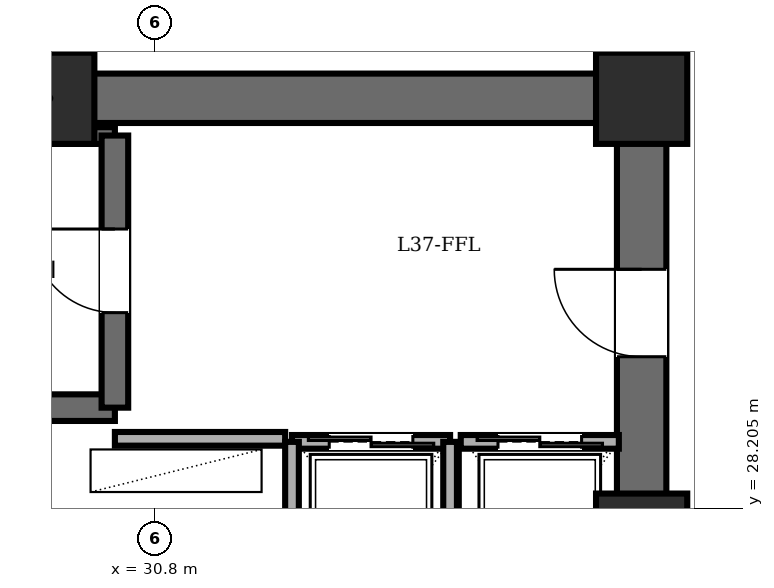
"""IFC4 building model, lengths in metres.
Left out: names, types, materials, properties, quantities, classifications, styles, units other than length and angle.
Written with IfcOpenShell. Run it as: python <this file> out.ifc"""

import sys

from ifc_helpers import new_model, si_unit, direction, frame, frame_2d, origin, origin_2d, place, context, subcontext, project, spatial, rectangle, extrude, element, fill, save


model = new_model("IFC4")
c1 = context("Model", 3, precision=1e-05, world=origin(), true_north=direction((0.0, 1.0)))
c2 = subcontext(c1, "Body", "Model", "MODEL_VIEW")
j1 = project(units=[si_unit("LENGTHUNIT", "METRE"), si_unit("PLANEANGLEUNIT", "RADIAN")], contexts=[c1])
p1 = place(None, origin())
s1 = spatial("IfcSite", under=j1, at=p1, CompositionType="ELEMENT")
p2 = place(p1, origin())
s2 = spatial("IfcBuilding", under=s1, at=p2, CompositionType="ELEMENT")
p3 = place(p2, frame((0.0, 0.0, 143.8)))
s3 = spatial("IfcBuildingStorey", under=s2, at=p3, CompositionType="ELEMENT", Elevation=143.8)
for number, where, z_axis, x_axis in (
    (1, (37.2, 27.8, 0.0), (0.0, 0.0, 1.0), (1.0, 0.0, 0.0)),
    (2, (37.2, 33.6, 0.0), (0.0, 0.0, 1.0), (1.0, 0.0, 0.0)),
    (3, (29.4, 33.6, 0.0), (0.0, 0.0, 1.0), (1.0, 0.0, 0.0)),
):
    element("IfcColumn", number, at=place(p3, frame(where, z_axis=z_axis, x_axis=x_axis)), inside=s3, PredefinedType="COLUMN", context=c2, shape_type="SweptSolid", body=[
        extrude(rectangle(XDim=1.2, YDim=1.2, at=origin_2d()), origin(), (0.0, 0.0, 1.0), 3.6),
    ])
p4 = place(p3, frame((21.6, 33.6, 0.0), z_axis=(0.0, 0.0, 1.0), x_axis=(1.0, 0.0, 0.0)))
e4 = element("IfcWall", 4, at=p4, inside=s3, PredefinedType="SHEAR", context=c2, shape_type="SweptSolid", body=[
    extrude(rectangle(XDim=15.6, YDim=0.65, at=frame_2d((7.8, 0.0))), origin(), (0.0, 0.0, 1.0), 3.4),
])
p5 = place(p3, frame((37.2, 14.4, 0.0), z_axis=(0.0, 0.0, 1.0), x_axis=(0.0, 1.0, 0.0)))
e5 = element("IfcWall", 5, at=p5, inside=s3, PredefinedType="SHEAR", context=c2, shape_type="SweptSolid", body=[
    extrude(rectangle(XDim=19.2, YDim=0.65, at=frame_2d((9.6, 0.0))), origin(), (0.0, 0.0, 1.0), 3.4),
])
p6 = place(p5, frame((15.8, 0.0, 0.0)))
e6 = element("IfcOpeningElement", 6, at=p6, cuts=e5, PredefinedType="OPENING", context=c2, shape_type="SweptSolid", body=[
    extrude(rectangle(XDim=1.15, YDim=2.15, at=frame_2d((0.575, 1.075))), frame((0.0, 0.335, 0.0), z_axis=(0.0, -1.0, 0.0), x_axis=(1.0, 0.0, 0.0)), (0.0, 0.0, 1.0), 0.67),
])
p7 = place(p5, frame((3.6, 0.0, 0.0)))
e7 = element("IfcOpeningElement", 7, at=p7, cuts=e5, PredefinedType="OPENING", context=c2, shape_type="SweptSolid", body=[
    extrude(rectangle(XDim=1.1, YDim=2.15, at=frame_2d((0.55, 1.075))), frame((0.0, 0.335, 0.0), z_axis=(0.0, -1.0, 0.0), x_axis=(1.0, 0.0, 0.0)), (0.0, 0.0, 1.0), 0.67),
])
p8 = place(p5, frame((8.6, 0.0, 0.0)))
e8 = element("IfcOpeningElement", 8, at=p8, cuts=e5, PredefinedType="OPENING", context=c2, shape_type="SweptSolid", body=[
    extrude(rectangle(XDim=1.3, YDim=2.2, at=frame_2d((0.65, 1.1))), frame((0.0, 0.335, 0.0), z_axis=(0.0, -1.0, 0.0), x_axis=(1.0, 0.0, 0.0)), (0.0, 0.0, 1.0), 0.67),
])
p9 = place(p3, frame((22.48, 29.53, 0.0), z_axis=(0.0, 0.0, 1.0), x_axis=(1.0, 0.0, 0.0)))
e9 = element("IfcWall", 9, at=p9, inside=s3, PredefinedType="SOLIDWALL", context=c2, shape_type="SweptSolid", body=[
    extrude(rectangle(XDim=7.79, YDim=0.35, at=frame_2d((3.895, 0.0))), origin(), (0.0, 0.0, 1.0), 3.4),
])
p10 = place(p3, frame((22.48, 33.11, 0.0), z_axis=(0.0, 0.0, 1.0), x_axis=(1.0, 0.0, 0.0)))
e10 = element("IfcWall", 10, at=p10, inside=s3, PredefinedType="PARTITIONING", context=c2, shape_type="SweptSolid", body=[
    extrude(rectangle(XDim=7.79, YDim=0.22, at=frame_2d((3.895, 0.0))), origin(), (0.0, 0.0, 1.0), 3.4),
])
p11 = place(p3, frame((30.27, 29.53, 0.0), z_axis=(0.0, 0.0, 1.0), x_axis=(0.0, 1.0, 0.0)))
e11 = element("IfcWall", 11, at=p11, inside=s3, PredefinedType="SOLIDWALL", context=c2, shape_type="SweptSolid", body=[
    extrude(rectangle(XDim=3.58, YDim=0.35, at=frame_2d((1.79, 0.0))), origin(), (0.0, 0.0, 1.0), 3.4),
])
p12 = place(p11, frame((1.25, 0.0, 0.0)))
e12 = element("IfcOpeningElement", 12, at=p12, cuts=e11, PredefinedType="OPENING", context=c2, shape_type="SweptSolid", body=[
    extrude(rectangle(XDim=1.1, YDim=2.15, at=frame_2d((0.55, 1.075))), frame((0.0, 0.185, 0.0), z_axis=(0.0, -1.0, 0.0), x_axis=(1.0, 0.0, 0.0)), (0.0, 0.0, 1.0), 0.37),
])
p13 = place(p3, frame((30.27, 29.12, 0.0), z_axis=(0.0, 0.0, 1.0), x_axis=(1.0, 0.0, 0.0)))
e13 = element("IfcWall", 13, at=p13, inside=s3, PredefinedType="PARTITIONING", context=c2, shape_type="SweptSolid", body=[
    extrude(rectangle(XDim=2.24, YDim=0.18, at=frame_2d((1.12, 0.0))), origin(), (0.0, 0.0, 1.0), 3.4),
])
p14 = place(p3, frame((32.6, 29.08, 0.0), z_axis=(0.0, 0.0, 1.0), x_axis=(1.0, 0.0, 0.0)))
e14 = element("IfcWall", 14, at=p14, inside=s3, PredefinedType="PARTITIONING", context=c2, shape_type="SweptSolid", body=[
    extrude(rectangle(XDim=2.08, YDim=0.18, at=frame_2d((1.04, 0.0))), origin(), (0.0, 0.0, 1.0), 3.4),
])
p15 = place(p14, frame((0.49, 0.0, 0.0)))
e15 = element("IfcOpeningElement", 15, at=p15, cuts=e14, PredefinedType="OPENING", context=c2, shape_type="SweptSolid", body=[
    extrude(rectangle(XDim=1.1, YDim=2.2, at=frame_2d((0.55, 1.1))), frame((0.0, 0.1, 0.0), z_axis=(0.0, -1.0, 0.0), x_axis=(1.0, 0.0, 0.0)), (0.0, 0.0, 1.0), 0.2),
])
for number, where, z_axis, x_axis in (
    (16, (34.68, 26.35, 0.0), (0.0, 0.0, 1.0), (0.0, 1.0, 0.0)),
    (17, (32.6, 29.08, 0.0), (0.0, 0.0, 1.0), (0.0, -1.0, 0.0)),
):
    element("IfcWall", number, at=place(p3, frame(where, z_axis=z_axis, x_axis=x_axis)), inside=s3, PredefinedType="PARTITIONING", context=c2, shape_type="SweptSolid", body=[
        extrude(rectangle(XDim=2.73, YDim=0.18, at=frame_2d((1.365, 0.0))), origin(), (0.0, 0.0, 1.0), 3.4),
    ])
p16 = place(p3, frame((34.82, 29.08, 0.0), z_axis=(0.0, 0.0, 1.0), x_axis=(1.0, 0.0, 0.0)))
e18 = element("IfcWall", 18, at=p16, inside=s3, PredefinedType="PARTITIONING", context=c2, shape_type="SweptSolid", body=[
    extrude(rectangle(XDim=2.08, YDim=0.18, at=frame_2d((1.04, 0.0))), origin(), (0.0, 0.0, 1.0), 3.4),
])
p17 = place(p16, frame((0.49, 0.0, 0.0)))
e19 = element("IfcOpeningElement", 19, at=p17, cuts=e18, PredefinedType="OPENING", context=c2, shape_type="SweptSolid", body=[
    extrude(rectangle(XDim=1.1, YDim=2.2, at=frame_2d((0.55, 1.1))), frame((0.0, 0.1, 0.0), z_axis=(0.0, -1.0, 0.0), x_axis=(1.0, 0.0, 0.0)), (0.0, 0.0, 1.0), 0.2),
])
p18 = place(p12, origin())
e20 = element("IfcDoor", 20, at=p18, inside=s3, OperationType="SINGLE_SWING_RIGHT", PredefinedType="DOOR", context=c2, shape_type="SweptSolid", body=[
    extrude(rectangle(XDim=1.1, YDim=2.15, at=frame_2d((0.55, 1.075))), frame((0.0, 0.025, 0.0), z_axis=(0.0, -1.0, 0.0), x_axis=(1.0, 0.0, 0.0)), (0.0, 0.0, 1.0), 0.05),
])
fill(e12, e20)
p19 = place(p6, origin())
e21 = element("IfcDoor", 21, at=p19, inside=s3, OperationType="SINGLE_SWING_RIGHT", PredefinedType="DOOR", context=c2, shape_type="SweptSolid", body=[
    extrude(rectangle(XDim=1.15, YDim=2.15, at=frame_2d((0.575, 1.075))), frame((0.0, 0.025, 0.0), z_axis=(0.0, -1.0, 0.0), x_axis=(1.0, 0.0, 0.0)), (0.0, 0.0, 1.0), 0.05),
])
fill(e6, e21)
p20 = place(p15, origin())
e22 = element("IfcDoor", 22, at=p20, inside=s3, OperationType="DOUBLE_DOOR_SLIDING", PredefinedType="DOOR", context=c2, shape_type="SweptSolid", body=[
    extrude(rectangle(XDim=1.1, YDim=2.2, at=frame_2d((0.55, 1.1))), frame((0.0, 0.025, 0.0), z_axis=(0.0, -1.0, 0.0), x_axis=(1.0, 0.0, 0.0)), (0.0, 0.0, 1.0), 0.05),
])
fill(e15, e22)
p21 = place(p17, origin())
e23 = element("IfcDoor", 23, at=p21, inside=s3, OperationType="DOUBLE_DOOR_SLIDING", PredefinedType="DOOR", context=c2, shape_type="SweptSolid", body=[
    extrude(rectangle(XDim=1.1, YDim=2.2, at=frame_2d((0.55, 1.1))), frame((0.0, 0.025, 0.0), z_axis=(0.0, -1.0, 0.0), x_axis=(1.0, 0.0, 0.0)), (0.0, 0.0, 1.0), 0.05),
])
fill(e19, e23)
save(model, sys.argv[1])
